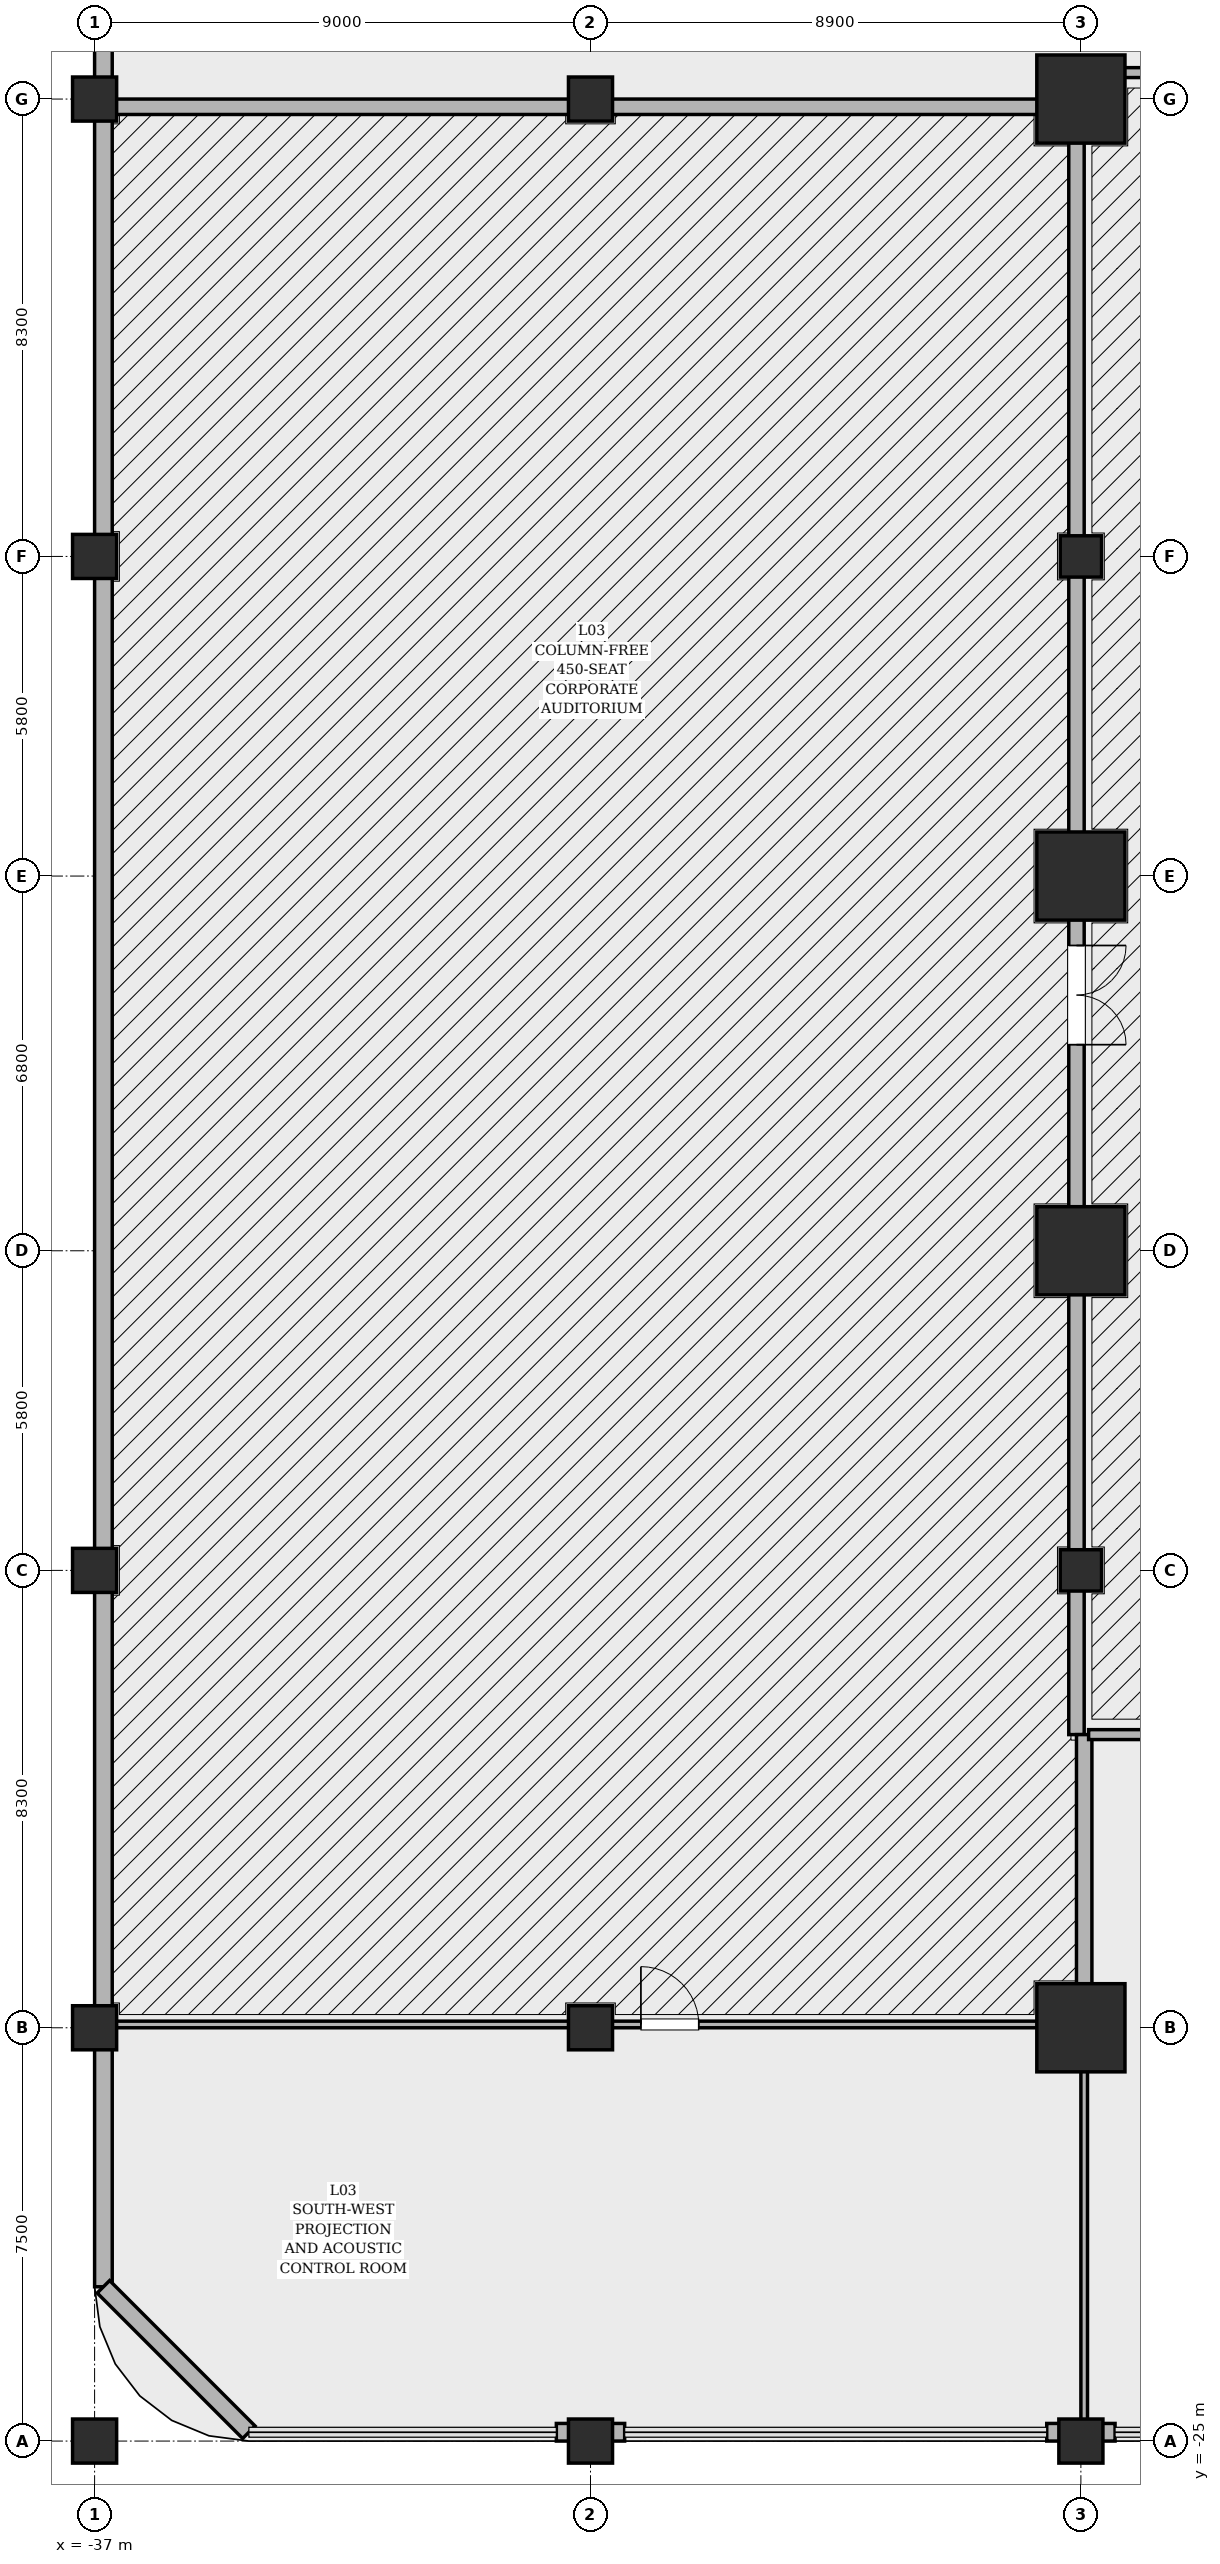
"""IFC4 building model, lengths in metres.
Left out: names, types, materials, properties, quantities, classifications, styles, units other than length and angle.
Written with IfcOpenShell. Run it as: python <this file> out.ifc"""

import sys

from ifc_helpers import new_model, si_unit, direction, frame, frame_2d, origin, origin_2d, place, context, subcontext, project, spatial, rectangle, hollow_rectangle, circle, extrude, element, fill, save


model = new_model("IFC4")
c1 = context("Model", 3, precision=1e-05, world=origin(), true_north=direction((0.0, 1.0)))
c2 = subcontext(c1, "Body", "Model", "MODEL_VIEW")
j1 = project(units=[si_unit("LENGTHUNIT", "METRE"), si_unit("PLANEANGLEUNIT", "RADIAN")], contexts=[c1])
p1 = place(None, origin())
s1 = spatial("IfcSite", under=j1, at=p1, CompositionType="ELEMENT")
p2 = place(p1, origin())
s2 = spatial("IfcBuilding", under=s1, at=p2, CompositionType="ELEMENT")
p3 = place(p2, frame((0.0, 0.0, 16.8)))
s3 = spatial("IfcBuildingStorey", under=s2, at=p3, CompositionType="ELEMENT", Elevation=16.8)
for number, where, z_axis, x_axis in (
    (1, (-19.1, -17.5, 0.0), (0.0, 0.0, 1.0), (1.0, 0.0, 0.0)),
    (2, (-19.1, 17.5, 0.0), (0.0, 0.0, 1.0), (1.0, 0.0, 0.0)),
    (3, (-19.1, 3.4, 0.0), (0.0, 0.0, 1.0), (1.0, 0.0, 0.0)),
    (4, (-19.1, -3.4, 0.0), (0.0, 0.0, 1.0), (1.0, 0.0, 0.0)),
):
    element("IfcColumn", number, at=place(p3, frame(where, z_axis=z_axis, x_axis=x_axis)), inside=s3, PredefinedType="COLUMN", context=c2, shape_type="SweptSolid", body=[
        extrude(hollow_rectangle(XDim=1.6, YDim=1.6, WallThickness=0.05, at=origin_2d()), origin(), (0.0, 0.0, 1.0), 5.4),
    ])
for number, where, z_axis, x_axis in (
    (5, (-37.0, -25.0, 0.0), (0.0, 0.0, 1.0), (1.0, 0.0, 0.0)),
    (6, (-28.0, -25.0, 0.0), (0.0, 0.0, 1.0), (1.0, 0.0, 0.0)),
    (7, (-19.1, -25.0, 0.0), (0.0, 0.0, 1.0), (1.0, 0.0, 0.0)),
    (8, (-37.0, -17.5, 0.0), (0.0, 0.0, 1.0), (1.0, 0.0, 0.0)),
    (9, (-28.0, -17.5, 0.0), (0.0, 0.0, 1.0), (1.0, 0.0, 0.0)),
    (10, (-37.0, -9.2, 0.0), (0.0, 0.0, 1.0), (1.0, 0.0, 0.0)),
    (11, (-37.0, 9.2, 0.0), (0.0, 0.0, 1.0), (1.0, 0.0, 0.0)),
    (12, (-37.0, 17.5, 0.0), (0.0, 0.0, 1.0), (1.0, 0.0, 0.0)),
    (13, (-28.0, 17.5, 0.0), (0.0, 0.0, 1.0), (1.0, 0.0, 0.0)),
):
    element("IfcColumn", number, at=place(p3, frame(where, z_axis=z_axis, x_axis=x_axis)), inside=s3, PredefinedType="COLUMN", context=c2, shape_type="SweptSolid", body=[
        extrude(rectangle(XDim=0.8, YDim=0.8, at=origin_2d()), origin(), (0.0, 0.0, 1.0), 5.4),
    ])
for number, where, z_axis, x_axis in (
    (14, (-19.1, -9.2, 0.0), (0.0, 0.0, 1.0), (1.0, 0.0, 0.0)),
    (15, (-19.1, 9.2, 0.0), (0.0, 0.0, 1.0), (1.0, 0.0, 0.0)),
):
    element("IfcColumn", number, at=place(p3, frame(where, z_axis=z_axis, x_axis=x_axis)), inside=s3, PredefinedType="PILASTER", context=c2, shape_type="SweptSolid", body=[
        extrude(circle(Radius=0.375, at=origin_2d()), origin(), (0.0, 0.0, 1.0), 5.4),
    ])
p4 = place(p3, frame((-28.62, -24.84, 0.0), z_axis=(0.0, 0.0, 1.0), x_axis=(1.0, 0.0, 0.0)))
e16 = element("IfcWall", 16, at=p4, inside=s3, PredefinedType="SOLIDWALL", context=c2, shape_type="SweptSolid", body=[
    extrude(rectangle(XDim=1.24, YDim=0.32, at=frame_2d((0.62, 0.0))), origin(), (0.0, 0.0, 1.0), 4.314),
])
p5 = place(p3, frame((-19.72, -24.84, 0.0), z_axis=(0.0, 0.0, 1.0), x_axis=(1.0, 0.0, 0.0)))
e17 = element("IfcWall", 17, at=p5, inside=s3, PredefinedType="SOLIDWALL", context=c2, shape_type="SweptSolid", body=[
    extrude(rectangle(XDim=1.24, YDim=0.32, at=frame_2d((0.62, 0.0))), origin(), (0.0, 0.0, 1.0), 4.314),
])
p6 = place(p3, frame((-36.84, -22.2, 0.0), z_axis=(0.0, 0.0, 1.0), x_axis=(0.0, 1.0, 0.0)))
e18 = element("IfcWall", 18, at=p6, inside=s3, PredefinedType="SOLIDWALL", context=c2, shape_type="SweptSolid", body=[
    extrude(rectangle(XDim=44.4, YDim=0.32, at=frame_2d((22.2, 0.0))), origin(), (0.0, 0.0, 1.0), 3.164),
])
p7 = place(p3, frame((-34.2, -24.84, 0.0), z_axis=(0.0, 0.0, 1.0), x_axis=(-0.707106781187, 0.707106781187, 0.0)))
e19 = element("IfcWall", 19, at=p7, inside=s3, PredefinedType="SOLIDWALL", context=c2, shape_type="SweptSolid", body=[
    extrude(rectangle(XDim=3.734, YDim=0.32, at=frame_2d((1.867, 0.0))), origin(), (0.0, 0.0, 1.0), 4.464),
])
p8 = place(p3, frame((-36.78, -17.44, 0.0), z_axis=(0.0, 0.0, 1.0), x_axis=(1.0, 0.0, 0.0)))
e20 = element("IfcWall", 20, at=p8, inside=s3, PredefinedType="PARTITIONING", context=c2, shape_type="SweptSolid", body=[
    extrude(rectangle(XDim=17.74, YDim=0.12, at=frame_2d((8.87, 0.0))), origin(), (0.0, 0.0, 1.0), 3.164),
])
p9 = place(p8, frame((9.695, 0.0, 0.0)))
e21 = element("IfcOpeningElement", 21, at=p9, cuts=e20, PredefinedType="OPENING", context=c2, shape_type="SweptSolid", body=[
    extrude(rectangle(XDim=1.05, YDim=2.2, at=frame_2d((0.525, 1.1))), frame((0.0, 0.07, 0.0), z_axis=(0.0, -1.0, 0.0), x_axis=(1.0, 0.0, 0.0)), (0.0, 0.0, 1.0), 0.14),
])
p10 = place(p3, frame((-19.04, -17.44, 0.0), z_axis=(0.0, 0.0, 1.0), x_axis=(0.0, -1.0, 0.0)))
e22 = element("IfcWall", 22, at=p10, inside=s3, PredefinedType="PARTITIONING", context=c2, shape_type="SweptSolid", body=[
    extrude(rectangle(XDim=7.34, YDim=0.12, at=frame_2d((3.67, 0.0))), origin(), (0.0, 0.0, 1.0), 3.164),
])
p11 = place(p3, frame((-36.78, 17.36, 0.0), z_axis=(0.0, 0.0, 1.0), x_axis=(1.0, 0.0, 0.0)))
e23 = element("IfcWall", 23, at=p11, inside=s3, PredefinedType="SOLIDWALL", context=c2, shape_type="SweptSolid", body=[
    extrude(rectangle(XDim=17.6, YDim=0.28, at=frame_2d((8.8, 0.0))), origin(), (0.0, 0.0, 1.0), 3.164),
])
p12 = place(p3, frame((-19.18, 17.36, 0.0), z_axis=(0.0, 0.0, 1.0), x_axis=(0.0, -1.0, 0.0)))
e24 = element("IfcWall", 24, at=p12, inside=s3, PredefinedType="SOLIDWALL", context=c2, shape_type="SweptSolid", body=[
    extrude(rectangle(XDim=29.54, YDim=0.28, at=frame_2d((14.77, 0.0))), origin(), (0.0, 0.0, 1.0), 3.164),
])
p13 = place(p12, frame((15.22, 0.0, 0.0)))
e25 = element("IfcOpeningElement", 25, at=p13, cuts=e24, PredefinedType="OPENING", context=c2, shape_type="SweptSolid", body=[
    extrude(rectangle(XDim=1.8, YDim=2.35, at=frame_2d((0.9, 1.175))), frame((0.0, 0.15, 0.0), z_axis=(0.0, -1.0, 0.0), x_axis=(1.0, 0.0, 0.0)), (0.0, 0.0, 1.0), 0.3),
])
p14 = place(p3, frame((-19.04, -12.18, 0.0), z_axis=(0.0, 0.0, 1.0), x_axis=(0.0, -1.0, 0.0)))
e26 = element("IfcWall", 26, at=p14, inside=s3, PredefinedType="SOLIDWALL", context=c2, shape_type="SweptSolid", body=[
    extrude(rectangle(XDim=5.18, YDim=0.28, at=frame_2d((2.59, 0.0))), origin(), (0.0, 0.0, 1.0), 3.164),
])
p15 = place(p3, frame((-16.46, 17.98, 0.0), z_axis=(0.0, 0.0, 1.0), x_axis=(-1.0, 0.0, 0.0)))
e27 = element("IfcWall", 27, at=p15, inside=s3, PredefinedType="PARTITIONING", context=c2, shape_type="SweptSolid", body=[
    extrude(rectangle(XDim=2.72, YDim=0.18, at=frame_2d((1.36, 0.0))), origin(), (0.0, 0.0, 1.0), 4.314),
])
p16 = place(p3, frame((-18.96, -12.18, 0.0), z_axis=(0.0, 0.0, 1.0), x_axis=(1.0, 0.0, 0.0)))
e28 = element("IfcWall", 28, at=p16, inside=s3, PredefinedType="PARTITIONING", context=c2, shape_type="SweptSolid", body=[
    extrude(rectangle(XDim=37.92, YDim=0.18, at=frame_2d((18.96, 0.0))), origin(), (0.0, 0.0, 1.0), 4.314),
])
p17 = place(p16, frame((18.435, 0.0, 0.0)))
e29 = element("IfcOpeningElement", 29, at=p17, cuts=e28, PredefinedType="OPENING", context=c2, shape_type="SweptSolid", body=[
    extrude(rectangle(XDim=1.05, YDim=2.2, at=frame_2d((0.525, 1.1))), frame((0.0, 0.1, 0.0), z_axis=(0.0, -1.0, 0.0), x_axis=(1.0, 0.0, 0.0)), (0.0, 0.0, 1.0), 0.2),
])
p18 = place(p9, origin())
e30 = element("IfcDoor", 30, at=p18, inside=s3, OperationType="SINGLE_SWING_LEFT", PredefinedType="DOOR", context=c2, shape_type="SweptSolid", body=[
    extrude(rectangle(XDim=1.05, YDim=2.2, at=frame_2d((0.525, 1.1))), frame((0.0, 0.025, 0.0), z_axis=(0.0, -1.0, 0.0), x_axis=(1.0, 0.0, 0.0)), (0.0, 0.0, 1.0), 0.05),
])
fill(e21, e30)
p19 = place(p13, origin())
e31 = element("IfcDoor", 31, at=p19, inside=s3, OperationType="DOUBLE_DOOR_SINGLE_SWING", PredefinedType="DOOR", context=c2, shape_type="SweptSolid", body=[
    extrude(rectangle(XDim=1.8, YDim=2.35, at=frame_2d((0.9, 1.175))), frame((0.0, 0.025, 0.0), z_axis=(0.0, -1.0, 0.0), x_axis=(1.0, 0.0, 0.0)), (0.0, 0.0, 1.0), 0.05),
])
fill(e25, e31)
save(model, sys.argv[1])
